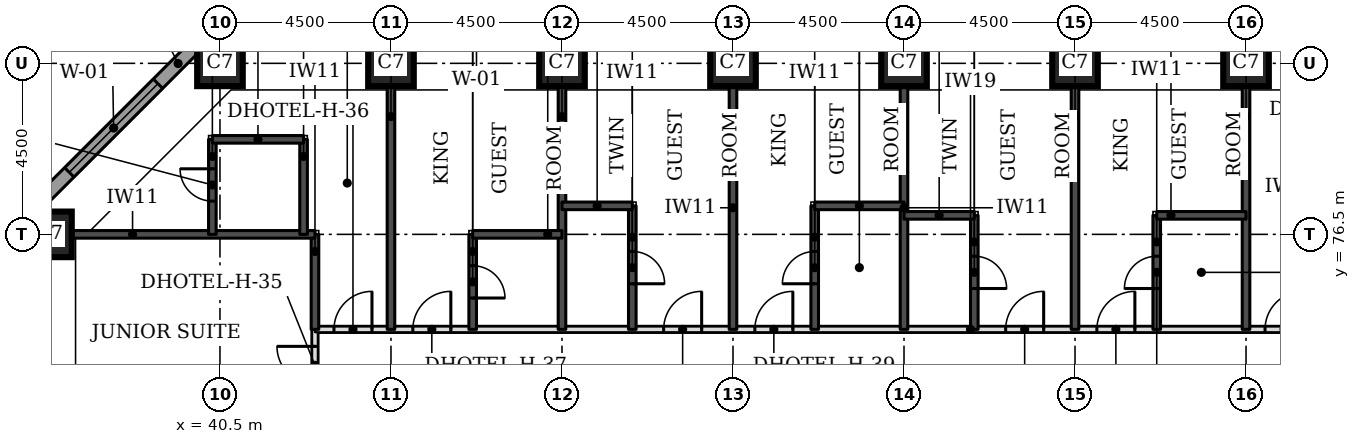
"""IFC4 building model, lengths in metres.
Left out: names, types, materials, properties, quantities, classifications, styles, units other than length and angle.
Written with IfcOpenShell. Run it as: python <this file> out.ifc"""

import sys

from ifc_helpers import new_model, si_unit, direction, frame, frame_2d, origin, origin_2d, place, context, subcontext, project, spatial, rectangle, extrude, element, fill, save


model = new_model("IFC4")
c1 = context("Model", 3, precision=1e-05, world=origin(), true_north=direction((0.0, 1.0)))
c2 = subcontext(c1, "Body", "Model", "MODEL_VIEW")
j1 = project(units=[si_unit("LENGTHUNIT", "METRE"), si_unit("PLANEANGLEUNIT", "RADIAN")], contexts=[c1])
p1 = place(None, origin())
s1 = spatial("IfcSite", under=j1, at=p1, CompositionType="ELEMENT")
p2 = place(p1, origin())
s2 = spatial("IfcBuilding", under=s1, at=p2, CompositionType="ELEMENT")
p3 = place(p2, frame((0.0, 0.0, 46.2)))
s3 = spatial("IfcBuildingStorey", under=s2, at=p3, CompositionType="ELEMENT", Elevation=46.2)
for number, where, z_axis, x_axis in (
    (1, (36.0, 76.5, 0.0), (0.0, 0.0, 1.0), (1.0, 0.0, 0.0)),
    (2, (40.5, 81.0, 0.0), (0.0, 0.0, 1.0), (1.0, 0.0, 0.0)),
    (3, (45.0, 81.0, 0.0), (0.0, 0.0, 1.0), (1.0, 0.0, 0.0)),
    (4, (49.5, 81.0, 0.0), (0.0, 0.0, 1.0), (1.0, 0.0, 0.0)),
    (5, (54.0, 81.0, 0.0), (0.0, 0.0, 1.0), (1.0, 0.0, 0.0)),
    (6, (58.5, 81.0, 0.0), (0.0, 0.0, 1.0), (1.0, 0.0, 0.0)),
    (7, (63.0, 81.0, 0.0), (0.0, 0.0, 1.0), (1.0, 0.0, 0.0)),
    (8, (67.5, 81.0, 0.0), (0.0, 0.0, 1.0), (1.0, 0.0, 0.0)),
):
    element("IfcColumn", number, at=place(p3, frame(where, z_axis=z_axis, x_axis=x_axis)), inside=s3, PredefinedType="COLUMN", context=c2, shape_type="SweptSolid", body=[
        extrude(rectangle(XDim=1.2, YDim=1.2, at=origin_2d()), origin(), (0.0, 0.0, 1.0), 3.3),
    ])
p4 = place(p3, frame((40.23, 81.826, 0.0), z_axis=(0.0, 0.0, 1.0), x_axis=(-0.707106781187, -0.707106781187, 0.0)))
e9 = element("IfcWall", 9, at=p4, inside=s3, PredefinedType="STANDARD", context=c2, shape_type="SweptSolid", body=[
    extrude(rectangle(XDim=7.151, YDim=0.35, at=frame_2d((3.576, 0.0))), origin(), (0.0, 0.0, 1.0), 3.055),
])
p5 = place(p4, frame((1.926, 0.0, 0.8)))
e10 = element("IfcOpeningElement", 10, at=p5, cuts=e9, PredefinedType="OPENING", context=c2, shape_type="SweptSolid", body=[
    extrude(rectangle(XDim=3.3, YDim=1.5, at=frame_2d((1.65, 0.75))), frame((0.0, 0.185, 0.0), z_axis=(0.0, -1.0, 0.0), x_axis=(1.0, 0.0, 0.0)), (0.0, 0.0, 1.0), 0.37),
])
p6 = place(p3, frame((43.0, 56.0, 0.0), z_axis=(0.0, 0.0, 1.0), x_axis=(0.0, 1.0, 0.0)))
e11 = element("IfcWall", 11, at=p6, inside=s3, PredefinedType="PARTITIONING", context=c2, shape_type="SweptSolid", body=[
    extrude(rectangle(XDim=18.0, YDim=0.15, at=frame_2d((9.0, 0.0))), origin(), (0.0, 0.0, 1.0), 3.08),
])
p7 = place(p6, frame((7.575, 0.0, 0.0)))
e12 = element("IfcOpeningElement", 12, at=p7, cuts=e11, PredefinedType="OPENING", context=c2, shape_type="SweptSolid", body=[
    extrude(rectangle(XDim=1.0, YDim=2.1, at=frame_2d((0.5, 1.05))), frame((0.0, 0.085, 0.0), z_axis=(0.0, -1.0, 0.0), x_axis=(1.0, 0.0, 0.0)), (0.0, 0.0, 1.0), 0.17),
])
p8 = place(p6, frame((16.553, 0.0, 0.0)))
e13 = element("IfcOpeningElement", 13, at=p8, cuts=e11, PredefinedType="OPENING", context=c2, shape_type="SweptSolid", body=[
    extrude(rectangle(XDim=1.0, YDim=2.1, at=frame_2d((0.5, 1.05))), frame((0.0, 0.085, 0.0), z_axis=(0.0, -1.0, 0.0), x_axis=(1.0, 0.0, 0.0)), (0.0, 0.0, 1.0), 0.17),
])
p9 = place(p6, frame((3.05, 0.0, 0.0)))
e14 = element("IfcOpeningElement", 14, at=p9, cuts=e11, PredefinedType="OPENING", context=c2, shape_type="SweptSolid", body=[
    extrude(rectangle(XDim=0.9, YDim=2.1, at=frame_2d((0.45, 1.05))), frame((0.0, 0.085, 0.0), z_axis=(0.0, -1.0, 0.0), x_axis=(1.0, 0.0, 0.0)), (0.0, 0.0, 1.0), 0.17),
])
p10 = place(p3, frame((43.0, 74.0, 0.0), z_axis=(0.0, 0.0, 1.0), x_axis=(1.0, 0.0, 0.0)))
e15 = element("IfcWall", 15, at=p10, inside=s3, PredefinedType="PARTITIONING", context=c2, shape_type="SweptSolid", body=[
    extrude(rectangle(XDim=26.5, YDim=0.15, at=frame_2d((13.25, 0.0))), origin(), (0.0, 0.0, 1.0), 3.08),
])
p11 = place(p10, frame((2.575, 0.0, 0.0)))
e16 = element("IfcOpeningElement", 16, at=p11, cuts=e15, PredefinedType="OPENING", context=c2, shape_type="SweptSolid", body=[
    extrude(rectangle(XDim=1.0, YDim=2.1, at=frame_2d((0.5, 1.05))), frame((0.0, 0.085, 0.0), z_axis=(0.0, -1.0, 0.0), x_axis=(1.0, 0.0, 0.0)), (0.0, 0.0, 1.0), 0.17),
])
p12 = place(p10, frame((9.175, 0.0, 0.0)))
e17 = element("IfcOpeningElement", 17, at=p12, cuts=e15, PredefinedType="OPENING", context=c2, shape_type="SweptSolid", body=[
    extrude(rectangle(XDim=1.0, YDim=2.1, at=frame_2d((0.5, 1.05))), frame((0.0, 0.085, 0.0), z_axis=(0.0, -1.0, 0.0), x_axis=(1.0, 0.0, 0.0)), (0.0, 0.0, 1.0), 0.17),
])
p13 = place(p10, frame((11.575, 0.0, 0.0)))
e18 = element("IfcOpeningElement", 18, at=p13, cuts=e15, PredefinedType="OPENING", context=c2, shape_type="SweptSolid", body=[
    extrude(rectangle(XDim=1.0, YDim=2.1, at=frame_2d((0.5, 1.05))), frame((0.0, 0.085, 0.0), z_axis=(0.0, -1.0, 0.0), x_axis=(1.0, 0.0, 0.0)), (0.0, 0.0, 1.0), 0.17),
])
p14 = place(p10, frame((18.175, 0.0, 0.0)))
e19 = element("IfcOpeningElement", 19, at=p14, cuts=e15, PredefinedType="OPENING", context=c2, shape_type="SweptSolid", body=[
    extrude(rectangle(XDim=1.0, YDim=2.1, at=frame_2d((0.5, 1.05))), frame((0.0, 0.085, 0.0), z_axis=(0.0, -1.0, 0.0), x_axis=(1.0, 0.0, 0.0)), (0.0, 0.0, 1.0), 0.17),
])
p15 = place(p10, frame((20.575, 0.0, 0.0)))
e20 = element("IfcOpeningElement", 20, at=p15, cuts=e15, PredefinedType="OPENING", context=c2, shape_type="SweptSolid", body=[
    extrude(rectangle(XDim=1.0, YDim=2.1, at=frame_2d((0.5, 1.05))), frame((0.0, 0.085, 0.0), z_axis=(0.0, -1.0, 0.0), x_axis=(1.0, 0.0, 0.0)), (0.0, 0.0, 1.0), 0.17),
])
p16 = place(p10, frame((0.5, 0.0, 0.0)))
e21 = element("IfcOpeningElement", 21, at=p16, cuts=e15, PredefinedType="OPENING", context=c2, shape_type="SweptSolid", body=[
    extrude(rectangle(XDim=1.0, YDim=2.1, at=frame_2d((0.5, 1.05))), frame((0.0, 0.085, 0.0), z_axis=(0.0, -1.0, 0.0), x_axis=(1.0, 0.0, 0.0)), (0.0, 0.0, 1.0), 0.17),
])
p17 = place(p10, frame((25.0, 0.0, 0.0)))
e22 = element("IfcOpeningElement", 22, at=p17, cuts=e15, PredefinedType="OPENING", context=c2, shape_type="SweptSolid", body=[
    extrude(rectangle(XDim=1.0, YDim=2.1, at=frame_2d((0.5, 1.05))), frame((0.0, 0.085, 0.0), z_axis=(0.0, -1.0, 0.0), x_axis=(1.0, 0.0, 0.0)), (0.0, 0.0, 1.0), 0.17),
])
p18 = place(p3, frame((43.0, 74.0, 0.0), z_axis=(0.0, 0.0, 1.0), x_axis=(0.0, 1.0, 0.0)))
e23 = element("IfcWall", 23, at=p18, inside=s3, PredefinedType="SOLIDWALL", context=c2, shape_type="SweptSolid", body=[
    extrude(rectangle(XDim=2.5, YDim=0.2, at=frame_2d((1.25, 0.0))), origin(), (0.0, 0.0, 1.0), 3.08),
])
p19 = place(p3, frame((45.0, 74.0, 0.0), z_axis=(0.0, 0.0, 1.0), x_axis=(0.0, 1.0, 0.0)))
e24 = element("IfcWall", 24, at=p19, inside=s3, PredefinedType="SOLIDWALL", context=c2, shape_type="SweptSolid", body=[
    extrude(rectangle(XDim=6.4, YDim=0.2, at=frame_2d((3.2, 0.0))), origin(), (0.0, 0.0, 1.0), 3.08),
])
p20 = place(p3, frame((47.15, 74.0, 0.0), z_axis=(0.0, 0.0, 1.0), x_axis=(0.0, 1.0, 0.0)))
e25 = element("IfcWall", 25, at=p20, inside=s3, PredefinedType="SOLIDWALL", context=c2, shape_type="SweptSolid", body=[
    extrude(rectangle(XDim=2.5, YDim=0.2, at=frame_2d((1.25, 0.0))), origin(), (0.0, 0.0, 1.0), 3.08),
])
p21 = place(p20, frame((0.825, 0.0, 0.0)))
e26 = element("IfcOpeningElement", 26, at=p21, cuts=e25, PredefinedType="OPENING", context=c2, shape_type="SweptSolid", body=[
    extrude(rectangle(XDim=0.85, YDim=2.1, at=frame_2d((0.425, 1.05))), frame((0.0, 0.11, 0.0), z_axis=(0.0, -1.0, 0.0), x_axis=(1.0, 0.0, 0.0)), (0.0, 0.0, 1.0), 0.22),
])
p22 = place(p3, frame((49.5, 74.0, 0.0), z_axis=(0.0, 0.0, 1.0), x_axis=(0.0, 1.0, 0.0)))
e27 = element("IfcWall", 27, at=p22, inside=s3, PredefinedType="SOLIDWALL", context=c2, shape_type="SweptSolid", body=[
    extrude(rectangle(XDim=6.4, YDim=0.2, at=frame_2d((3.2, 0.0))), origin(), (0.0, 0.0, 1.0), 3.08),
])
p23 = place(p3, frame((51.35, 74.0, 0.0), z_axis=(0.0, 0.0, 1.0), x_axis=(0.0, 1.0, 0.0)))
e28 = element("IfcWall", 28, at=p23, inside=s3, PredefinedType="SOLIDWALL", context=c2, shape_type="SweptSolid", body=[
    extrude(rectangle(XDim=3.25, YDim=0.2, at=frame_2d((1.625, 0.0))), origin(), (0.0, 0.0, 1.0), 3.08),
])
p24 = place(p23, frame((1.2, 0.0, 0.0)))
e29 = element("IfcOpeningElement", 29, at=p24, cuts=e28, PredefinedType="OPENING", context=c2, shape_type="SweptSolid", body=[
    extrude(rectangle(XDim=0.85, YDim=2.1, at=frame_2d((0.425, 1.05))), frame((0.0, 0.11, 0.0), z_axis=(0.0, -1.0, 0.0), x_axis=(1.0, 0.0, 0.0)), (0.0, 0.0, 1.0), 0.22),
])
p25 = place(p3, frame((54.0, 74.0, 0.0), z_axis=(0.0, 0.0, 1.0), x_axis=(0.0, 1.0, 0.0)))
e30 = element("IfcWall", 30, at=p25, inside=s3, PredefinedType="SOLIDWALL", context=c2, shape_type="SweptSolid", body=[
    extrude(rectangle(XDim=6.4, YDim=0.2, at=frame_2d((3.2, 0.0))), origin(), (0.0, 0.0, 1.0), 3.08),
])
p26 = place(p3, frame((56.15, 74.0, 0.0), z_axis=(0.0, 0.0, 1.0), x_axis=(0.0, 1.0, 0.0)))
e31 = element("IfcWall", 31, at=p26, inside=s3, PredefinedType="SOLIDWALL", context=c2, shape_type="SweptSolid", body=[
    extrude(rectangle(XDim=3.25, YDim=0.2, at=frame_2d((1.625, 0.0))), origin(), (0.0, 0.0, 1.0), 3.08),
])
p27 = place(p26, frame((1.2, 0.0, 0.0)))
e32 = element("IfcOpeningElement", 32, at=p27, cuts=e31, PredefinedType="OPENING", context=c2, shape_type="SweptSolid", body=[
    extrude(rectangle(XDim=0.85, YDim=2.1, at=frame_2d((0.425, 1.05))), frame((0.0, 0.11, 0.0), z_axis=(0.0, -1.0, 0.0), x_axis=(1.0, 0.0, 0.0)), (0.0, 0.0, 1.0), 0.22),
])
p28 = place(p3, frame((58.5, 74.0, 0.0), z_axis=(0.0, 0.0, 1.0), x_axis=(0.0, 1.0, 0.0)))
e33 = element("IfcWall", 33, at=p28, inside=s3, PredefinedType="SOLIDWALL", context=c2, shape_type="SweptSolid", body=[
    extrude(rectangle(XDim=6.4, YDim=0.2, at=frame_2d((3.2, 0.0))), origin(), (0.0, 0.0, 1.0), 3.08),
])
p29 = place(p3, frame((60.35, 74.0, 0.0), z_axis=(0.0, 0.0, 1.0), x_axis=(0.0, 1.0, 0.0)))
e34 = element("IfcWall", 34, at=p29, inside=s3, PredefinedType="SOLIDWALL", context=c2, shape_type="SweptSolid", body=[
    extrude(rectangle(XDim=3.0, YDim=0.2, at=frame_2d((1.5, 0.0))), origin(), (0.0, 0.0, 1.0), 3.08),
])
p30 = place(p29, frame((1.075, 0.0, 0.0)))
e35 = element("IfcOpeningElement", 35, at=p30, cuts=e34, PredefinedType="OPENING", context=c2, shape_type="SweptSolid", body=[
    extrude(rectangle(XDim=0.85, YDim=2.1, at=frame_2d((0.425, 1.05))), frame((0.0, 0.11, 0.0), z_axis=(0.0, -1.0, 0.0), x_axis=(1.0, 0.0, 0.0)), (0.0, 0.0, 1.0), 0.22),
])
p31 = place(p3, frame((63.0, 74.0, 0.0), z_axis=(0.0, 0.0, 1.0), x_axis=(0.0, 1.0, 0.0)))
e36 = element("IfcWall", 36, at=p31, inside=s3, PredefinedType="SOLIDWALL", context=c2, shape_type="SweptSolid", body=[
    extrude(rectangle(XDim=6.4, YDim=0.2, at=frame_2d((3.2, 0.0))), origin(), (0.0, 0.0, 1.0), 3.08),
])
p32 = place(p3, frame((65.15, 74.0, 0.0), z_axis=(0.0, 0.0, 1.0), x_axis=(0.0, 1.0, 0.0)))
e37 = element("IfcWall", 37, at=p32, inside=s3, PredefinedType="SOLIDWALL", context=c2, shape_type="SweptSolid", body=[
    extrude(rectangle(XDim=3.0, YDim=0.2, at=frame_2d((1.5, 0.0))), origin(), (0.0, 0.0, 1.0), 3.08),
])
p33 = place(p32, frame((1.075, 0.0, 0.0)))
e38 = element("IfcOpeningElement", 38, at=p33, cuts=e37, PredefinedType="OPENING", context=c2, shape_type="SweptSolid", body=[
    extrude(rectangle(XDim=0.85, YDim=2.1, at=frame_2d((0.425, 1.05))), frame((0.0, 0.11, 0.0), z_axis=(0.0, -1.0, 0.0), x_axis=(1.0, 0.0, 0.0)), (0.0, 0.0, 1.0), 0.22),
])
for number, where, z_axis, x_axis in (
    (39, (67.5, 74.0, 0.0), (0.0, 0.0, 1.0), (0.0, 1.0, 0.0)),
    (40, (36.6, 76.5, 0.0), (0.0, 0.0, 1.0), (1.0, 0.0, 0.0)),
):
    element("IfcWall", number, at=place(p3, frame(where, z_axis=z_axis, x_axis=x_axis)), inside=s3, PredefinedType="SOLIDWALL", context=c2, shape_type="SweptSolid", body=[
        extrude(rectangle(XDim=6.4, YDim=0.2, at=frame_2d((3.2, 0.0))), origin(), (0.0, 0.0, 1.0), 3.08),
    ])
p34 = place(p3, frame((40.3, 76.5, 0.0), z_axis=(0.0, 0.0, 1.0), x_axis=(0.0, 1.0, 0.0)))
e41 = element("IfcWall", 41, at=p34, inside=s3, PredefinedType="SOLIDWALL", context=c2, shape_type="SweptSolid", body=[
    extrude(rectangle(XDim=2.5, YDim=0.2, at=frame_2d((1.25, 0.0))), origin(), (0.0, 0.0, 1.0), 3.08),
])
p35 = place(p34, frame((0.875, 0.0, 0.0)))
e42 = element("IfcOpeningElement", 42, at=p35, cuts=e41, PredefinedType="OPENING", context=c2, shape_type="SweptSolid", body=[
    extrude(rectangle(XDim=0.85, YDim=2.1, at=frame_2d((0.425, 1.05))), frame((0.0, 0.11, 0.0), z_axis=(0.0, -1.0, 0.0), x_axis=(1.0, 0.0, 0.0)), (0.0, 0.0, 1.0), 0.22),
])
p36 = place(p3, frame((42.7, 76.5, 0.0), z_axis=(0.0, 0.0, 1.0), x_axis=(0.0, 1.0, 0.0)))
e43 = element("IfcWall", 43, at=p36, inside=s3, PredefinedType="SOLIDWALL", context=c2, shape_type="SweptSolid", body=[
    extrude(rectangle(XDim=2.5, YDim=0.2, at=frame_2d((1.25, 0.0))), origin(), (0.0, 0.0, 1.0), 3.08),
])
p37 = place(p3, frame((47.15, 76.5, 0.0), z_axis=(0.0, 0.0, 1.0), x_axis=(1.0, 0.0, 0.0)))
e44 = element("IfcWall", 44, at=p37, inside=s3, PredefinedType="SOLIDWALL", context=c2, shape_type="SweptSolid", body=[
    extrude(rectangle(XDim=2.35, YDim=0.2, at=frame_2d((1.175, 0.0))), origin(), (0.0, 0.0, 1.0), 3.08),
])
p38 = place(p3, frame((58.5, 77.0, 0.0), z_axis=(0.0, 0.0, 1.0), x_axis=(1.0, 0.0, 0.0)))
e45 = element("IfcWall", 45, at=p38, inside=s3, PredefinedType="SOLIDWALL", context=c2, shape_type="SweptSolid", body=[
    extrude(rectangle(XDim=1.85, YDim=0.2, at=frame_2d((0.925, 0.0))), origin(), (0.0, 0.0, 1.0), 3.08),
])
p39 = place(p3, frame((65.15, 77.0, 0.0), z_axis=(0.0, 0.0, 1.0), x_axis=(1.0, 0.0, 0.0)))
e46 = element("IfcWall", 46, at=p39, inside=s3, PredefinedType="SOLIDWALL", context=c2, shape_type="SweptSolid", body=[
    extrude(rectangle(XDim=2.35, YDim=0.2, at=frame_2d((1.175, 0.0))), origin(), (0.0, 0.0, 1.0), 3.08),
])
p40 = place(p3, frame((49.5, 77.25, 0.0), z_axis=(0.0, 0.0, 1.0), x_axis=(1.0, 0.0, 0.0)))
e47 = element("IfcWall", 47, at=p40, inside=s3, PredefinedType="SOLIDWALL", context=c2, shape_type="SweptSolid", body=[
    extrude(rectangle(XDim=1.85, YDim=0.2, at=frame_2d((0.925, 0.0))), origin(), (0.0, 0.0, 1.0), 3.08),
])
p41 = place(p3, frame((56.15, 77.25, 0.0), z_axis=(0.0, 0.0, 1.0), x_axis=(1.0, 0.0, 0.0)))
e48 = element("IfcWall", 48, at=p41, inside=s3, PredefinedType="SOLIDWALL", context=c2, shape_type="SweptSolid", body=[
    extrude(rectangle(XDim=2.35, YDim=0.2, at=frame_2d((1.175, 0.0))), origin(), (0.0, 0.0, 1.0), 3.08),
])
p42 = place(p3, frame((40.3, 79.0, 0.0), z_axis=(0.0, 0.0, 1.0), x_axis=(1.0, 0.0, 0.0)))
e49 = element("IfcWall", 49, at=p42, inside=s3, PredefinedType="SOLIDWALL", context=c2, shape_type="SweptSolid", body=[
    extrude(rectangle(XDim=2.4, YDim=0.2, at=frame_2d((1.2, 0.0))), origin(), (0.0, 0.0, 1.0), 3.08),
])
p43 = place(p5, origin())
e50 = element("IfcWindow", 50, at=p43, inside=s3, PartitioningType="SINGLE_PANEL", PredefinedType="WINDOW", context=c2, shape_type="SweptSolid", body=[
    extrude(rectangle(XDim=3.3, YDim=1.5, at=frame_2d((1.65, 0.75))), frame((0.0, 0.085, 0.0), z_axis=(0.0, -1.0, 0.0), x_axis=(1.0, 0.0, 0.0)), (0.0, 0.0, 1.0), 0.06),
])
fill(e10, e50)
p44 = place(p8, origin())
e51 = element("IfcDoor", 51, at=p44, inside=s3, OperationType="SINGLE_SWING_RIGHT", PredefinedType="DOOR", context=c2, shape_type="SweptSolid", body=[
    extrude(rectangle(XDim=1.0, YDim=2.1, at=frame_2d((0.5, 1.05))), frame((0.0, 0.025, 0.0), z_axis=(0.0, -1.0, 0.0), x_axis=(1.0, 0.0, 0.0)), (0.0, 0.0, 1.0), 0.05),
])
fill(e13, e51)
p45 = place(p11, origin())
e52 = element("IfcDoor", 52, at=p45, inside=s3, OperationType="SINGLE_SWING_RIGHT", PredefinedType="DOOR", context=c2, shape_type="SweptSolid", body=[
    extrude(rectangle(XDim=1.0, YDim=2.1, at=frame_2d((0.5, 1.05))), frame((0.0, 0.025, 0.0), z_axis=(0.0, -1.0, 0.0), x_axis=(1.0, 0.0, 0.0)), (0.0, 0.0, 1.0), 0.05),
])
fill(e16, e52)
p46 = place(p21, frame((0.85, 0.0, 0.0), z_axis=(0.0, 0.0, 1.0), x_axis=(-1.0, 0.0, 0.0)))
e53 = element("IfcDoor", 53, at=p46, inside=s3, OperationType="SINGLE_SWING_RIGHT", PredefinedType="DOOR", context=c2, shape_type="SweptSolid", body=[
    extrude(rectangle(XDim=0.85, YDim=2.1, at=frame_2d((0.425, 1.05))), frame((0.0, 0.025, 0.0), z_axis=(0.0, -1.0, 0.0), x_axis=(1.0, 0.0, 0.0)), (0.0, 0.0, 1.0), 0.05),
])
fill(e26, e53)
p47 = place(p12, origin())
e54 = element("IfcDoor", 54, at=p47, inside=s3, OperationType="SINGLE_SWING_RIGHT", PredefinedType="DOOR", context=c2, shape_type="SweptSolid", body=[
    extrude(rectangle(XDim=1.0, YDim=2.1, at=frame_2d((0.5, 1.05))), frame((0.0, 0.025, 0.0), z_axis=(0.0, -1.0, 0.0), x_axis=(1.0, 0.0, 0.0)), (0.0, 0.0, 1.0), 0.05),
])
fill(e17, e54)
p48 = place(p24, frame((0.85, 0.0, 0.0), z_axis=(0.0, 0.0, 1.0), x_axis=(-1.0, 0.0, 0.0)))
e55 = element("IfcDoor", 55, at=p48, inside=s3, OperationType="SINGLE_SWING_RIGHT", PredefinedType="DOOR", context=c2, shape_type="SweptSolid", body=[
    extrude(rectangle(XDim=0.85, YDim=2.1, at=frame_2d((0.425, 1.05))), frame((0.0, 0.025, 0.0), z_axis=(0.0, -1.0, 0.0), x_axis=(1.0, 0.0, 0.0)), (0.0, 0.0, 1.0), 0.05),
])
fill(e29, e55)
p49 = place(p13, origin())
e56 = element("IfcDoor", 56, at=p49, inside=s3, OperationType="SINGLE_SWING_RIGHT", PredefinedType="DOOR", context=c2, shape_type="SweptSolid", body=[
    extrude(rectangle(XDim=1.0, YDim=2.1, at=frame_2d((0.5, 1.05))), frame((0.0, 0.025, 0.0), z_axis=(0.0, -1.0, 0.0), x_axis=(1.0, 0.0, 0.0)), (0.0, 0.0, 1.0), 0.05),
])
fill(e18, e56)
p50 = place(p27, origin())
e57 = element("IfcDoor", 57, at=p50, inside=s3, OperationType="SINGLE_SWING_LEFT", PredefinedType="DOOR", context=c2, shape_type="SweptSolid", body=[
    extrude(rectangle(XDim=0.85, YDim=2.1, at=frame_2d((0.425, 1.05))), frame((0.0, 0.025, 0.0), z_axis=(0.0, -1.0, 0.0), x_axis=(1.0, 0.0, 0.0)), (0.0, 0.0, 1.0), 0.05),
])
fill(e32, e57)
p51 = place(p14, origin())
e58 = element("IfcDoor", 58, at=p51, inside=s3, OperationType="SINGLE_SWING_RIGHT", PredefinedType="DOOR", context=c2, shape_type="SweptSolid", body=[
    extrude(rectangle(XDim=1.0, YDim=2.1, at=frame_2d((0.5, 1.05))), frame((0.0, 0.025, 0.0), z_axis=(0.0, -1.0, 0.0), x_axis=(1.0, 0.0, 0.0)), (0.0, 0.0, 1.0), 0.05),
])
fill(e19, e58)
p52 = place(p30, frame((0.85, 0.0, 0.0), z_axis=(0.0, 0.0, 1.0), x_axis=(-1.0, 0.0, 0.0)))
e59 = element("IfcDoor", 59, at=p52, inside=s3, OperationType="SINGLE_SWING_RIGHT", PredefinedType="DOOR", context=c2, shape_type="SweptSolid", body=[
    extrude(rectangle(XDim=0.85, YDim=2.1, at=frame_2d((0.425, 1.05))), frame((0.0, 0.025, 0.0), z_axis=(0.0, -1.0, 0.0), x_axis=(1.0, 0.0, 0.0)), (0.0, 0.0, 1.0), 0.05),
])
fill(e35, e59)
p53 = place(p15, origin())
e60 = element("IfcDoor", 60, at=p53, inside=s3, OperationType="SINGLE_SWING_RIGHT", PredefinedType="DOOR", context=c2, shape_type="SweptSolid", body=[
    extrude(rectangle(XDim=1.0, YDim=2.1, at=frame_2d((0.5, 1.05))), frame((0.0, 0.025, 0.0), z_axis=(0.0, -1.0, 0.0), x_axis=(1.0, 0.0, 0.0)), (0.0, 0.0, 1.0), 0.05),
])
fill(e20, e60)
p54 = place(p33, origin())
e61 = element("IfcDoor", 61, at=p54, inside=s3, OperationType="SINGLE_SWING_LEFT", PredefinedType="DOOR", context=c2, shape_type="SweptSolid", body=[
    extrude(rectangle(XDim=0.85, YDim=2.1, at=frame_2d((0.425, 1.05))), frame((0.0, 0.025, 0.0), z_axis=(0.0, -1.0, 0.0), x_axis=(1.0, 0.0, 0.0)), (0.0, 0.0, 1.0), 0.05),
])
fill(e38, e61)
p55 = place(p16, origin())
e62 = element("IfcDoor", 62, at=p55, inside=s3, OperationType="SINGLE_SWING_RIGHT", PredefinedType="DOOR", context=c2, shape_type="SweptSolid", body=[
    extrude(rectangle(XDim=1.0, YDim=2.1, at=frame_2d((0.5, 1.05))), frame((0.0, 0.025, 0.0), z_axis=(0.0, -1.0, 0.0), x_axis=(1.0, 0.0, 0.0)), (0.0, 0.0, 1.0), 0.05),
])
fill(e21, e62)
p56 = place(p35, origin())
e63 = element("IfcDoor", 63, at=p56, inside=s3, OperationType="SINGLE_SWING_RIGHT", PredefinedType="DOOR", context=c2, shape_type="SweptSolid", body=[
    extrude(rectangle(XDim=0.85, YDim=2.1, at=frame_2d((0.425, 1.05))), frame((0.0, 0.025, 0.0), z_axis=(0.0, -1.0, 0.0), x_axis=(1.0, 0.0, 0.0)), (0.0, 0.0, 1.0), 0.05),
])
fill(e42, e63)
p57 = place(p17, origin())
e64 = element("IfcDoor", 64, at=p57, inside=s3, OperationType="SINGLE_SWING_RIGHT", PredefinedType="DOOR", context=c2, shape_type="SweptSolid", body=[
    extrude(rectangle(XDim=1.0, YDim=2.1, at=frame_2d((0.5, 1.05))), frame((0.0, 0.025, 0.0), z_axis=(0.0, -1.0, 0.0), x_axis=(1.0, 0.0, 0.0)), (0.0, 0.0, 1.0), 0.05),
])
fill(e22, e64)
save(model, sys.argv[1])
